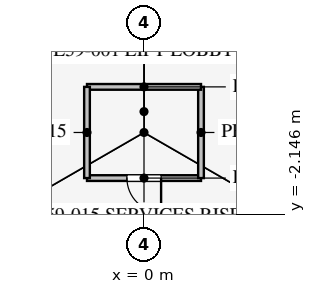
"""IFC4 building model, lengths in metres.
Left out: names, types, materials, properties, quantities, classifications, styles, units other than length and angle.
Written with IfcOpenShell. Run it as: python <this file> out.ifc"""

import sys

from ifc_helpers import new_model, si_unit, direction, frame, frame_2d, origin, place, context, subcontext, project, spatial, rectangle, extrude, element, fill, save


model = new_model("IFC4")
c1 = context("Model", 3, precision=1e-05, world=origin(), true_north=direction((0.0, 1.0)))
c2 = subcontext(c1, "Body", "Model", "MODEL_VIEW")
j1 = project(units=[si_unit("LENGTHUNIT", "METRE"), si_unit("PLANEANGLEUNIT", "RADIAN")], contexts=[c1])
p1 = place(None, origin())
s1 = spatial("IfcSite", under=j1, at=p1, CompositionType="ELEMENT")
p2 = place(p1, origin())
s2 = spatial("IfcBuilding", under=s1, at=p2, CompositionType="ELEMENT")
p3 = place(p2, frame((0.0, 0.0, 256.9)))
s3 = spatial("IfcBuildingStorey", under=s2, at=p3, CompositionType="ELEMENT", Elevation=256.9)
p4 = place(p3, frame((-1.5, -1.2, 0.0), z_axis=(0.0, 0.0, 1.0), x_axis=(1.0, 0.0, 0.0)))
e1 = element("IfcWall", 1, at=p4, inside=s3, PredefinedType="PARTITIONING", context=c2, shape_type="SweptSolid", body=[
    extrude(rectangle(XDim=3.0, YDim=0.15, at=frame_2d((1.5, 0.0))), origin(), (0.0, 0.0, 1.0), 4.0),
])
p5 = place(p4, frame((1.05, 0.0, 0.0)))
e2 = element("IfcOpeningElement", 2, at=p5, cuts=e1, PredefinedType="OPENING", context=c2, shape_type="SweptSolid", body=[
    extrude(rectangle(XDim=0.9, YDim=2.1, at=frame_2d((0.45, 1.05))), frame((0.0, 0.085, 0.0), z_axis=(0.0, -1.0, 0.0), x_axis=(1.0, 0.0, 0.0)), (0.0, 0.0, 1.0), 0.17),
])
p6 = place(p3, frame((1.5, -1.2, 0.0), z_axis=(0.0, 0.0, 1.0), x_axis=(0.0, 1.0, 0.0)))
e3 = element("IfcWall", 3, at=p6, inside=s3, PredefinedType="PARTITIONING", context=c2, shape_type="SweptSolid", body=[
    extrude(rectangle(XDim=2.4, YDim=0.15, at=frame_2d((1.2, 0.0))), origin(), (0.0, 0.0, 1.0), 4.0),
])
p7 = place(p3, frame((1.5, 1.2, 0.0), z_axis=(0.0, 0.0, 1.0), x_axis=(-1.0, 0.0, 0.0)))
e4 = element("IfcWall", 4, at=p7, inside=s3, PredefinedType="PARTITIONING", context=c2, shape_type="SweptSolid", body=[
    extrude(rectangle(XDim=3.0, YDim=0.15, at=frame_2d((1.5, 0.0))), origin(), (0.0, 0.0, 1.0), 4.0),
])
p8 = place(p3, frame((-1.5, 1.2, 0.0), z_axis=(0.0, 0.0, 1.0), x_axis=(0.0, -1.0, 0.0)))
e5 = element("IfcWall", 5, at=p8, inside=s3, PredefinedType="PARTITIONING", context=c2, shape_type="SweptSolid", body=[
    extrude(rectangle(XDim=2.4, YDim=0.15, at=frame_2d((1.2, 0.0))), origin(), (0.0, 0.0, 1.0), 4.0),
])
p9 = place(p3, frame((-0.016, 30.392, 0.0), z_axis=(0.0, 0.0, 1.0), x_axis=(-0.500000626146, -0.866025042278, 0.0)))
e6 = element("IfcWall", 6, at=p9, inside=s3, PredefinedType="PARTITIONING", context=c2, shape_type="SweptSolid", body=[
    extrude(rectangle(XDim=52.624, YDim=0.12, at=frame_2d((26.312, 0.0))), origin(), (0.0, 0.0, 1.0), 2.9),
])
p10 = place(p9, frame((10.15, 0.0, 0.15)))
e7 = element("IfcOpeningElement", 7, at=p10, cuts=e6, PredefinedType="OPENING", context=c2, shape_type="SweptSolid", body=[
    extrude(rectangle(XDim=1.8, YDim=2.1, at=frame_2d((0.9, 1.05))), frame((0.0, 0.07, 0.0), z_axis=(0.0, -1.0, 0.0), x_axis=(1.0, 0.0, 0.0)), (0.0, 0.0, 1.0), 0.14),
])
p11 = place(p9, frame((40.65, 0.0, 0.15)))
e8 = element("IfcOpeningElement", 8, at=p11, cuts=e6, PredefinedType="OPENING", context=c2, shape_type="SweptSolid", body=[
    extrude(rectangle(XDim=1.8, YDim=2.1, at=frame_2d((0.9, 1.05))), frame((0.0, 0.07, 0.0), z_axis=(0.0, -1.0, 0.0), x_axis=(1.0, 0.0, 0.0)), (0.0, 0.0, 1.0), 0.14),
])
p12 = place(p5, frame((0.9, 0.0, 0.0), z_axis=(0.0, 0.0, 1.0), x_axis=(-1.0, 0.0, 0.0)))
e9 = element("IfcDoor", 9, at=p12, inside=s3, OperationType="SINGLE_SWING_LEFT", PredefinedType="DOOR", context=c2, shape_type="SweptSolid", body=[
    extrude(rectangle(XDim=0.9, YDim=2.1, at=frame_2d((0.45, 1.05))), frame((0.0, 0.025, 0.0), z_axis=(0.0, -1.0, 0.0), x_axis=(1.0, 0.0, 0.0)), (0.0, 0.0, 1.0), 0.05),
])
fill(e2, e9)
save(model, sys.argv[1])
